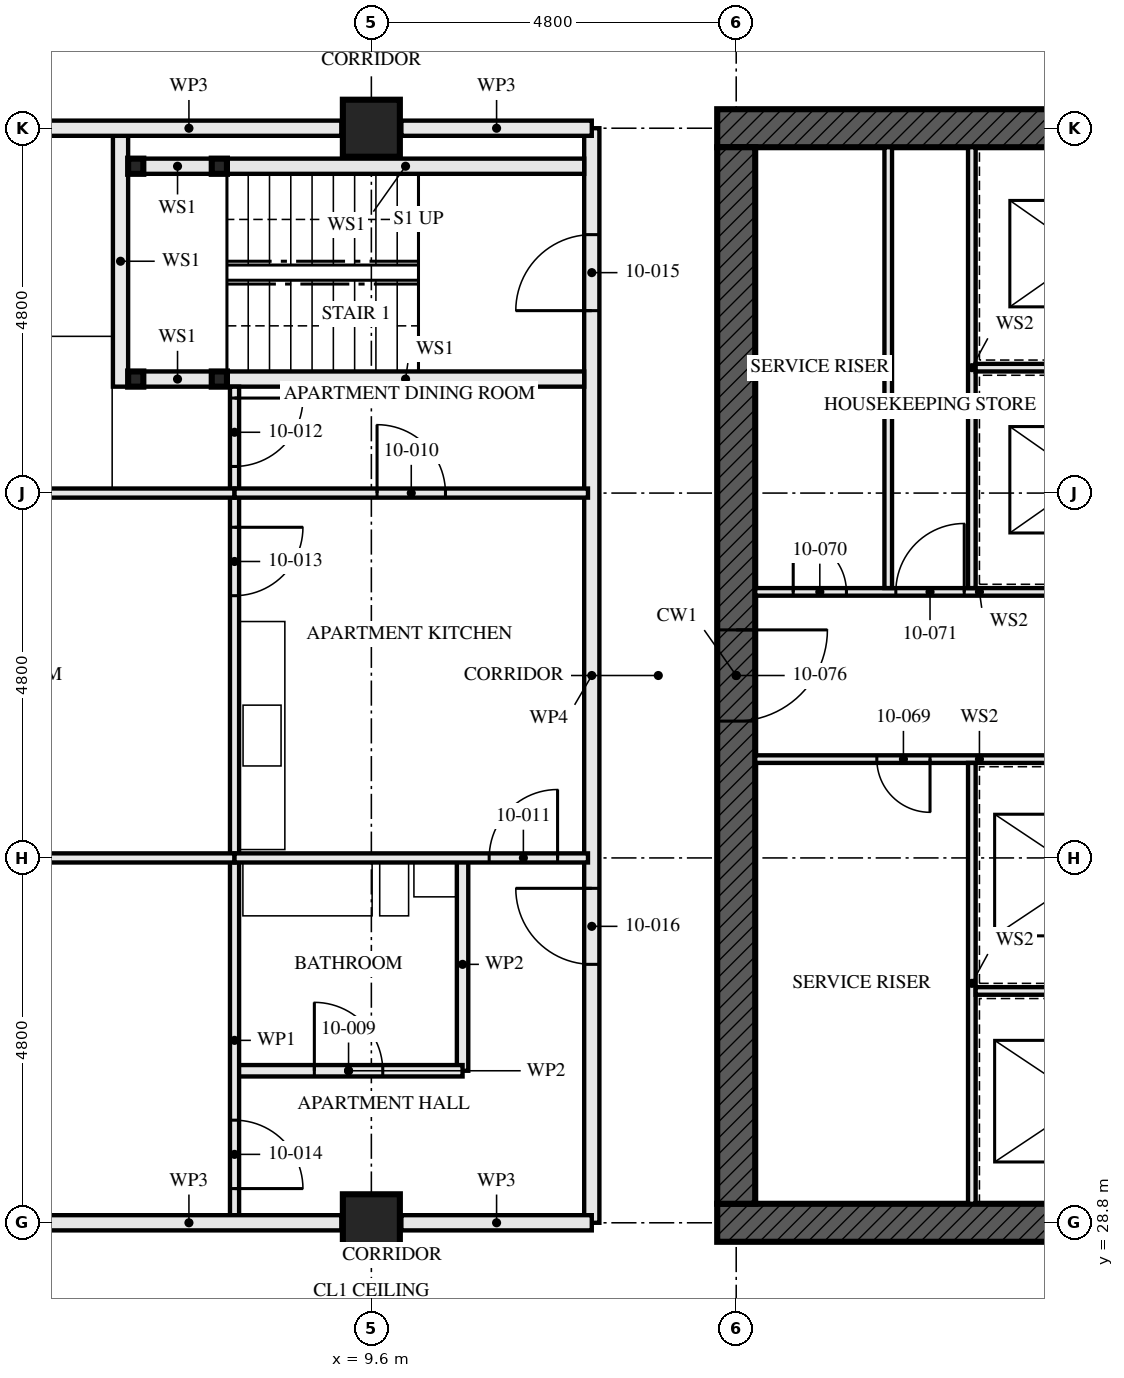
"""IFC4 building model, lengths in metres.
Left out: names, types, materials, properties, quantities, classifications, styles, units other than length and angle.
Written with IfcOpenShell. Run it as: python <this file> out.ifc"""

import sys

from ifc_helpers import new_model, si_unit, direction, frame, frame_2d, origin, origin_2d, place, context, subcontext, project, spatial, rectangle, hollow_rectangle, extrude, element, fill, save


model = new_model("IFC4")
c1 = context("Model", 3, precision=1e-05, world=origin(), true_north=direction((0.0, 1.0)))
c2 = subcontext(c1, "Body", "Model", "MODEL_VIEW")
j1 = project(units=[si_unit("LENGTHUNIT", "METRE"), si_unit("PLANEANGLEUNIT", "RADIAN")], contexts=[c1])
p1 = place(None, origin())
s1 = spatial("IfcSite", under=j1, at=p1, CompositionType="ELEMENT")
p2 = place(p1, origin())
s2 = spatial("IfcBuilding", under=s1, at=p2, CompositionType="ELEMENT")
p3 = place(p2, frame((0.0, 0.0, 41.0)))
s3 = spatial("IfcBuildingStorey", under=s2, at=p3, CompositionType="ELEMENT", Elevation=41.0)
for number, where, z_axis, x_axis in (
    (1, (9.6, 28.8, 0.0), (0.0, 0.0, 1.0), (0.0, 1.0, 0.0)),
    (2, (9.6, 43.2, 0.0), (0.0, 0.0, 1.0), (0.0, 1.0, 0.0)),
):
    element("IfcColumn", number, at=place(p3, frame(where, z_axis=z_axis, x_axis=x_axis)), inside=s3, PredefinedType="COLUMN", context=c2, shape_type="SweptSolid", body=[
        extrude(hollow_rectangle(XDim=0.75, YDim=0.75, WallThickness=0.08, at=origin_2d()), origin(), (0.0, 0.0, 1.0), 3.5),
    ])
p4 = place(p3, frame((14.15, 28.8, -0.17), z_axis=(0.0, 0.0, 1.0), x_axis=(1.0, 0.0, 0.0)))
e3 = element("IfcWall", 3, at=p4, inside=s3, PredefinedType="SHEAR", context=c2, shape_type="SweptSolid", body=[
    extrude(rectangle(XDim=14.9, YDim=0.5, at=frame_2d((7.45, 0.0))), origin(), (0.0, 0.0, 1.0), 3.5),
])
p5 = place(p4, frame((6.85, 0.0, 0.17)))
e4 = element("IfcOpeningElement", 4, at=p5, cuts=e3, PredefinedType="OPENING", context=c2, shape_type="SweptSolid", body=[
    extrude(rectangle(XDim=1.2, YDim=2.1, at=frame_2d((0.6, 1.05))), frame((0.0, 0.26, 0.0), z_axis=(0.0, -1.0, 0.0), x_axis=(1.0, 0.0, 0.0)), (0.0, 0.0, 1.0), 0.521),
])
p6 = place(p3, frame((29.05, 43.2, -0.17), z_axis=(0.0, 0.0, 1.0), x_axis=(-1.0, 0.0, 0.0)))
e5 = element("IfcWall", 5, at=p6, inside=s3, PredefinedType="SHEAR", context=c2, shape_type="SweptSolid", body=[
    extrude(rectangle(XDim=14.9, YDim=0.5, at=frame_2d((7.45, 0.0))), origin(), (0.0, 0.0, 1.0), 3.5),
])
p7 = place(p6, frame((6.85, 0.0, 0.17)))
e6 = element("IfcOpeningElement", 6, at=p7, cuts=e5, PredefinedType="OPENING", context=c2, shape_type="SweptSolid", body=[
    extrude(rectangle(XDim=1.2, YDim=2.1, at=frame_2d((0.6, 1.05))), frame((0.0, 0.26, 0.0), z_axis=(0.0, -1.0, 0.0), x_axis=(1.0, 0.0, 0.0)), (0.0, 0.0, 1.0), 0.521),
])
p8 = place(p3, frame((14.4, 42.95, -0.17), z_axis=(0.0, 0.0, 1.0), x_axis=(0.0, -1.0, 0.0)))
e7 = element("IfcWall", 7, at=p8, inside=s3, PredefinedType="SHEAR", context=c2, shape_type="SweptSolid", body=[
    extrude(rectangle(XDim=13.9, YDim=0.5, at=frame_2d((6.95, 0.0))), origin(), (0.0, 0.0, 1.0), 3.5),
])
p9 = place(p8, frame((6.35, 0.0, 0.17)))
e8 = element("IfcOpeningElement", 8, at=p9, cuts=e7, PredefinedType="OPENING", context=c2, shape_type="SweptSolid", body=[
    extrude(rectangle(XDim=1.2, YDim=2.1, at=frame_2d((0.6, 1.05))), frame((0.0, 0.26, 0.0), z_axis=(0.0, -1.0, 0.0), x_axis=(1.0, 0.0, 0.0)), (0.0, 0.0, 1.0), 0.521),
])
for number, where, z_axis, x_axis in (
    (9, (6.5, 42.7, 0.0), (0.0, 0.0, 1.0), (1.0, 0.0, 0.0)),
    (10, (6.5, 39.9, 0.0), (0.0, 0.0, 1.0), (1.0, 0.0, 0.0)),
    (11, (7.6, 42.7, 0.0), (0.0, 0.0, 1.0), (1.0, 0.0, 0.0)),
    (12, (7.6, 39.9, 0.0), (0.0, 0.0, 1.0), (1.0, 0.0, 0.0)),
):
    element("IfcColumn", number, at=place(p3, frame(where, z_axis=z_axis, x_axis=x_axis)), inside=s3, PredefinedType="COLUMN", context=c2, shape_type="SweptSolid", body=[
        extrude(hollow_rectangle(XDim=0.2, YDim=0.2, WallThickness=0.008, at=origin_2d()), origin(), (0.0, 0.0, 1.0), 3.33),
    ])
p10 = place(p3, frame((6.6, 42.7, 0.0), z_axis=(0.0, 0.0, 1.0), x_axis=(1.0, 0.0, 0.0)))
e13 = element("IfcWall", 13, at=p10, inside=s3, PredefinedType="SOLIDWALL", context=c2, shape_type="SweptSolid", body=[
    extrude(rectangle(XDim=0.9, YDim=0.2, at=frame_2d((0.45, 0.0))), origin(), (0.0, 0.0, 1.0), 2.99),
])
p11 = place(p3, frame((7.7, 42.7, 0.0), z_axis=(0.0, 0.0, 1.0), x_axis=(1.0, 0.0, 0.0)))
e14 = element("IfcWall", 14, at=p11, inside=s3, PredefinedType="SOLIDWALL", context=c2, shape_type="SweptSolid", body=[
    extrude(rectangle(XDim=4.7, YDim=0.2, at=frame_2d((2.35, 0.0))), origin(), (0.0, 0.0, 1.0), 2.99),
])
p12 = place(p3, frame((6.6, 39.9, 0.0), z_axis=(0.0, 0.0, 1.0), x_axis=(1.0, 0.0, 0.0)))
e15 = element("IfcWall", 15, at=p12, inside=s3, PredefinedType="SOLIDWALL", context=c2, shape_type="SweptSolid", body=[
    extrude(rectangle(XDim=0.9, YDim=0.2, at=frame_2d((0.45, 0.0))), origin(), (0.0, 0.0, 1.0), 2.99),
])
p13 = place(p3, frame((7.7, 39.9, 0.0), z_axis=(0.0, 0.0, 1.0), x_axis=(1.0, 0.0, 0.0)))
e16 = element("IfcWall", 16, at=p13, inside=s3, PredefinedType="SOLIDWALL", context=c2, shape_type="SweptSolid", body=[
    extrude(rectangle(XDim=4.7, YDim=0.2, at=frame_2d((2.35, 0.0))), origin(), (0.0, 0.0, 1.0), 2.99),
])
p14 = place(p3, frame((6.3, 43.1, 0.0), z_axis=(0.0, 0.0, 1.0), x_axis=(0.0, -1.0, 0.0)))
e17 = element("IfcWall", 17, at=p14, inside=s3, PredefinedType="SOLIDWALL", context=c2, shape_type="SweptSolid", body=[
    extrude(rectangle(XDim=3.3, YDim=0.2, at=frame_2d((1.65, 0.0))), origin(), (0.0, 0.0, 1.0), 3.33),
])
p15 = place(p3, frame((7.8, 30.8, 0.0), z_axis=(0.0, 0.0, 1.0), x_axis=(1.0, 0.0, 0.0)))
e18 = element("IfcWall", 18, at=p15, inside=s3, PredefinedType="PARTITIONING", context=c2, shape_type="SweptSolid", body=[
    extrude(rectangle(XDim=3.0, YDim=0.15, at=frame_2d((1.5, 0.0))), origin(), (0.0, 0.0, 1.0), 3.33),
])
p16 = place(p15, frame((1.05, 0.0, 0.0)))
e19 = element("IfcOpeningElement", 19, at=p16, cuts=e18, PredefinedType="OPENING", context=c2, shape_type="SweptSolid", body=[
    extrude(rectangle(XDim=0.9, YDim=2.1, at=frame_2d((0.45, 1.05))), frame((0.0, 0.085, 0.0), z_axis=(0.0, -1.0, 0.0), x_axis=(1.0, 0.0, 0.0)), (0.0, 0.0, 1.0), 0.171),
])
p17 = place(p3, frame((10.8, 33.6, 0.0), z_axis=(0.0, 0.0, 1.0), x_axis=(0.0, -1.0, 0.0)))
e20 = element("IfcWall", 20, at=p17, inside=s3, PredefinedType="PARTITIONING", context=c2, shape_type="SweptSolid", body=[
    extrude(rectangle(XDim=2.8, YDim=0.15, at=frame_2d((1.4, 0.0))), origin(), (0.0, 0.0, 1.0), 3.33),
])
p18 = place(p3, frame((7.8, 38.4, 0.0), z_axis=(0.0, 0.0, 1.0), x_axis=(1.0, 0.0, 0.0)))
e21 = element("IfcWall", 21, at=p18, inside=s3, PredefinedType="PARTITIONING", context=c2, shape_type="SweptSolid", body=[
    extrude(rectangle(XDim=4.65, YDim=0.12, at=frame_2d((2.325, 0.0))), origin(), (0.0, 0.0, 1.0), 2.55),
])
p19 = place(p18, frame((1.875, 0.0, 0.0)))
e22 = element("IfcOpeningElement", 22, at=p19, cuts=e21, PredefinedType="OPENING", context=c2, shape_type="SweptSolid", body=[
    extrude(rectangle(XDim=0.9, YDim=2.1, at=frame_2d((0.45, 1.05))), frame((0.0, 0.071, 0.0), z_axis=(0.0, -1.0, 0.0), x_axis=(1.0, 0.0, 0.0)), (0.0, 0.0, 1.0), 0.141),
])
p20 = place(p3, frame((7.8, 33.6, 0.0), z_axis=(0.0, 0.0, 1.0), x_axis=(1.0, 0.0, 0.0)))
e23 = element("IfcWall", 23, at=p20, inside=s3, PredefinedType="PARTITIONING", context=c2, shape_type="SweptSolid", body=[
    extrude(rectangle(XDim=4.65, YDim=0.12, at=frame_2d((2.325, 0.0))), origin(), (0.0, 0.0, 1.0), 2.55),
])
p21 = place(p20, frame((3.35, 0.0, 0.0)))
e24 = element("IfcOpeningElement", 24, at=p21, cuts=e23, PredefinedType="OPENING", context=c2, shape_type="SweptSolid", body=[
    extrude(rectangle(XDim=0.9, YDim=2.1, at=frame_2d((0.45, 1.05))), frame((0.0, 0.071, 0.0), z_axis=(0.0, -1.0, 0.0), x_axis=(1.0, 0.0, 0.0)), (0.0, 0.0, 1.0), 0.141),
])
p22 = place(p3, frame((7.8, 39.8, 0.0), z_axis=(0.0, 0.0, 1.0), x_axis=(0.0, -1.0, 0.0)))
e25 = element("IfcWall", 25, at=p22, inside=s3, PredefinedType="PARTITIONING", context=c2, shape_type="SweptSolid", body=[
    extrude(rectangle(XDim=1.4, YDim=0.12, at=frame_2d((0.7, 0.0))), origin(), (0.0, 0.0, 1.0), 3.33),
])
p23 = place(p22, frame((0.15, 0.0, 0.0)))
e26 = element("IfcOpeningElement", 26, at=p23, cuts=e25, PredefinedType="OPENING", context=c2, shape_type="SweptSolid", body=[
    extrude(rectangle(XDim=0.9, YDim=2.1, at=frame_2d((0.45, 1.05))), frame((0.0, 0.071, 0.0), z_axis=(0.0, -1.0, 0.0), x_axis=(1.0, 0.0, 0.0)), (0.0, 0.0, 1.0), 0.141),
])
p24 = place(p3, frame((7.8, 38.4, 0.0), z_axis=(0.0, 0.0, 1.0), x_axis=(0.0, -1.0, 0.0)))
e27 = element("IfcWall", 27, at=p24, inside=s3, PredefinedType="PARTITIONING", context=c2, shape_type="SweptSolid", body=[
    extrude(rectangle(XDim=4.8, YDim=0.12, at=frame_2d((2.4, 0.0))), origin(), (0.0, 0.0, 1.0), 3.33),
])
p25 = place(p24, frame((0.45, 0.0, 0.0)))
e28 = element("IfcOpeningElement", 28, at=p25, cuts=e27, PredefinedType="OPENING", context=c2, shape_type="SweptSolid", body=[
    extrude(rectangle(XDim=0.9, YDim=2.1, at=frame_2d((0.45, 1.05))), frame((0.0, 0.071, 0.0), z_axis=(0.0, -1.0, 0.0), x_axis=(1.0, 0.0, 0.0)), (0.0, 0.0, 1.0), 0.141),
])
p26 = place(p3, frame((7.8, 33.6, 0.0), z_axis=(0.0, 0.0, 1.0), x_axis=(0.0, -1.0, 0.0)))
e29 = element("IfcWall", 29, at=p26, inside=s3, PredefinedType="PARTITIONING", context=c2, shape_type="SweptSolid", body=[
    extrude(rectangle(XDim=4.8, YDim=0.12, at=frame_2d((2.4, 0.0))), origin(), (0.0, 0.0, 1.0), 3.33),
])
p27 = place(p26, frame((3.45, 0.0, 0.0)))
e30 = element("IfcOpeningElement", 30, at=p27, cuts=e29, PredefinedType="OPENING", context=c2, shape_type="SweptSolid", body=[
    extrude(rectangle(XDim=0.9, YDim=2.1, at=frame_2d((0.45, 1.05))), frame((0.0, 0.071, 0.0), z_axis=(0.0, -1.0, 0.0), x_axis=(1.0, 0.0, 0.0)), (0.0, 0.0, 1.0), 0.141),
])
for number, where, z_axis, x_axis in (
    (31, (0.395, 38.4, 0.0), (0.0, 0.0, 1.0), (1.0, 0.0, 0.0)),
    (32, (0.395, 33.6, 0.0), (0.0, 0.0, 1.0), (1.0, 0.0, 0.0)),
):
    element("IfcWall", number, at=place(p3, frame(where, z_axis=z_axis, x_axis=x_axis)), inside=s3, PredefinedType="PARTITIONING", context=c2, shape_type="SweptSolid", body=[
        extrude(rectangle(XDim=7.405, YDim=0.12, at=frame_2d((3.703, 0.0))), origin(), (0.0, 0.0, 1.0), 2.55),
    ])
p28 = place(p3, frame((12.5, 43.2, 0.0), z_axis=(0.0, 0.0, 1.0), x_axis=(0.0, -1.0, 0.0)))
e33 = element("IfcWall", 33, at=p28, inside=s3, PredefinedType="PARTITIONING", context=c2, shape_type="SweptSolid", body=[
    extrude(rectangle(XDim=14.4, YDim=0.2, at=frame_2d((7.2, 0.0))), origin(), (0.0, 0.0, 1.0), 2.55),
])
p29 = place(p28, frame((1.4, 0.0, 0.0)))
e34 = element("IfcOpeningElement", 34, at=p29, cuts=e33, PredefinedType="OPENING", context=c2, shape_type="SweptSolid", body=[
    extrude(rectangle(XDim=1.0, YDim=2.1, at=frame_2d((0.5, 1.05))), frame((0.0, 0.111, 0.0), z_axis=(0.0, -1.0, 0.0), x_axis=(1.0, 0.0, 0.0)), (0.0, 0.0, 1.0), 0.221),
])
p30 = place(p28, frame((10.0, 0.0, 0.0)))
e35 = element("IfcOpeningElement", 35, at=p30, cuts=e33, PredefinedType="OPENING", context=c2, shape_type="SweptSolid", body=[
    extrude(rectangle(XDim=1.0, YDim=2.1, at=frame_2d((0.5, 1.05))), frame((0.0, 0.111, 0.0), z_axis=(0.0, -1.0, 0.0), x_axis=(1.0, 0.0, 0.0)), (0.0, 0.0, 1.0), 0.221),
])
p31 = place(p3, frame((16.4, 37.15, 0.0), z_axis=(0.0, 0.0, 1.0), x_axis=(0.0, 1.0, 0.0)))
e36 = element("IfcWall", 36, at=p31, inside=s3, PredefinedType="SOLIDWALL", context=c2, shape_type="SweptSolid", body=[
    extrude(rectangle(XDim=5.8, YDim=0.1, at=frame_2d((2.9, 0.0))), origin(), (0.0, 0.0, 1.0), 3.33),
])
p32 = place(p3, frame((14.65, 34.9, 0.0), z_axis=(0.0, 0.0, 1.0), x_axis=(1.0, 0.0, 0.0)))
e37 = element("IfcWall", 37, at=p32, inside=s3, PredefinedType="SOLIDWALL", context=c2, shape_type="SweptSolid", body=[
    extrude(rectangle(XDim=5.9, YDim=0.1, at=frame_2d((2.95, 0.0))), origin(), (0.0, 0.0, 1.0), 3.33),
])
p33 = place(p32, frame((1.6, 0.0, 0.0)))
e38 = element("IfcOpeningElement", 38, at=p33, cuts=e37, PredefinedType="OPENING", context=c2, shape_type="SweptSolid", body=[
    extrude(rectangle(XDim=0.7, YDim=2.1, at=frame_2d((0.35, 1.05))), frame((0.0, 0.061, 0.0), z_axis=(0.0, -1.0, 0.0), x_axis=(1.0, 0.0, 0.0)), (0.0, 0.0, 1.0), 0.121),
])
p34 = place(p3, frame((14.65, 37.1, 0.0), z_axis=(0.0, 0.0, 1.0), x_axis=(1.0, 0.0, 0.0)))
e39 = element("IfcWall", 39, at=p34, inside=s3, PredefinedType="SOLIDWALL", context=c2, shape_type="SweptSolid", body=[
    extrude(rectangle(XDim=5.9, YDim=0.1, at=frame_2d((2.95, 0.0))), origin(), (0.0, 0.0, 1.0), 3.33),
])
p35 = place(p34, frame((0.5, 0.0, 0.0)))
e40 = element("IfcOpeningElement", 40, at=p35, cuts=e39, PredefinedType="OPENING", context=c2, shape_type="SweptSolid", body=[
    extrude(rectangle(XDim=0.7, YDim=2.1, at=frame_2d((0.35, 1.05))), frame((0.0, 0.061, 0.0), z_axis=(0.0, -1.0, 0.0), x_axis=(1.0, 0.0, 0.0)), (0.0, 0.0, 1.0), 0.121),
])
p36 = place(p34, frame((1.85, 0.0, 0.0)))
e41 = element("IfcOpeningElement", 41, at=p36, cuts=e39, PredefinedType="OPENING", context=c2, shape_type="SweptSolid", body=[
    extrude(rectangle(XDim=0.9, YDim=2.1, at=frame_2d((0.45, 1.05))), frame((0.0, 0.061, 0.0), z_axis=(0.0, -1.0, 0.0), x_axis=(1.0, 0.0, 0.0)), (0.0, 0.0, 1.0), 0.121),
])
p37 = place(p3, frame((17.5, 29.05, 0.0), z_axis=(0.0, 0.0, 1.0), x_axis=(0.0, 1.0, 0.0)))
e42 = element("IfcWall", 42, at=p37, inside=s3, PredefinedType="SOLIDWALL", context=c2, shape_type="SweptSolid", body=[
    extrude(rectangle(XDim=5.8, YDim=0.1, at=frame_2d((2.9, 0.0))), origin(), (0.0, 0.0, 1.0), 3.33),
])
p38 = place(p3, frame((17.55, 31.85, 0.0), z_axis=(0.0, 0.0, 1.0), x_axis=(1.0, 0.0, 0.0)))
e43 = element("IfcWall", 43, at=p38, inside=s3, PredefinedType="SOLIDWALL", context=c2, shape_type="SweptSolid", body=[
    extrude(rectangle(XDim=2.9, YDim=0.1, at=frame_2d((1.45, 0.0))), origin(), (0.0, 0.0, 1.0), 3.33),
])
p39 = place(p3, frame((17.5, 37.15, 0.0), z_axis=(0.0, 0.0, 1.0), x_axis=(0.0, 1.0, 0.0)))
e44 = element("IfcWall", 44, at=p39, inside=s3, PredefinedType="SOLIDWALL", context=c2, shape_type="SweptSolid", body=[
    extrude(rectangle(XDim=5.8, YDim=0.1, at=frame_2d((2.9, 0.0))), origin(), (0.0, 0.0, 1.0), 3.33),
])
p40 = place(p3, frame((17.55, 40.05, 0.0), z_axis=(0.0, 0.0, 1.0), x_axis=(1.0, 0.0, 0.0)))
e45 = element("IfcWall", 45, at=p40, inside=s3, PredefinedType="SOLIDWALL", context=c2, shape_type="SweptSolid", body=[
    extrude(rectangle(XDim=2.9, YDim=0.1, at=frame_2d((1.45, 0.0))), origin(), (0.0, 0.0, 1.0), 3.33),
])
p41 = place(p3, frame((12.5, 28.8, 0.0), z_axis=(0.0, 0.0, 1.0), x_axis=(-1.0, 0.0, 0.0)))
e46 = element("IfcWall", 46, at=p41, inside=s3, PredefinedType="PARTITIONING", context=c2, shape_type="SweptSolid", body=[
    extrude(rectangle(XDim=2.505, YDim=0.2, at=frame_2d((1.252, 0.0))), origin(), (0.0, 0.0, 1.0), 2.32),
])
p42 = place(p3, frame((9.205, 28.8, 0.0), z_axis=(0.0, 0.0, 1.0), x_axis=(-1.0, 0.0, 0.0)))
e47 = element("IfcWall", 47, at=p42, inside=s3, PredefinedType="PARTITIONING", context=c2, shape_type="SweptSolid", body=[
    extrude(rectangle(XDim=4.01, YDim=0.2, at=frame_2d((2.005, 0.0))), origin(), (0.0, 0.0, 1.0), 2.32),
])
p43 = place(p3, frame((12.5, 43.2, 0.0), z_axis=(0.0, 0.0, 1.0), x_axis=(-1.0, 0.0, 0.0)))
e48 = element("IfcWall", 48, at=p43, inside=s3, PredefinedType="PARTITIONING", context=c2, shape_type="SweptSolid", body=[
    extrude(rectangle(XDim=2.505, YDim=0.2, at=frame_2d((1.252, 0.0))), origin(), (0.0, 0.0, 1.0), 2.32),
])
p44 = place(p3, frame((9.205, 43.2, 0.0), z_axis=(0.0, 0.0, 1.0), x_axis=(-1.0, 0.0, 0.0)))
e49 = element("IfcWall", 49, at=p44, inside=s3, PredefinedType="PARTITIONING", context=c2, shape_type="SweptSolid", body=[
    extrude(rectangle(XDim=4.01, YDim=0.2, at=frame_2d((2.005, 0.0))), origin(), (0.0, 0.0, 1.0), 2.32),
])
p45 = place(p16, origin())
e50 = element("IfcDoor", 50, at=p45, inside=s3, OperationType="SINGLE_SWING_RIGHT", PredefinedType="DOOR", context=c2, shape_type="SweptSolid", body=[
    extrude(rectangle(XDim=0.9, YDim=2.1, at=frame_2d((0.45, 1.05))), frame((0.0, 0.022, 0.0), z_axis=(0.0, -1.0, 0.0), x_axis=(1.0, 0.0, 0.0)), (0.0, 0.0, 1.0), 0.044),
])
fill(e19, e50)
p46 = place(p19, origin())
e51 = element("IfcDoor", 51, at=p46, inside=s3, OperationType="SINGLE_SWING_RIGHT", PredefinedType="DOOR", context=c2, shape_type="SweptSolid", body=[
    extrude(rectangle(XDim=0.9, YDim=2.1, at=frame_2d((0.45, 1.05))), frame((0.0, 0.022, 0.0), z_axis=(0.0, -1.0, 0.0), x_axis=(1.0, 0.0, 0.0)), (0.0, 0.0, 1.0), 0.044),
])
fill(e22, e51)
p47 = place(p21, origin())
e52 = element("IfcDoor", 52, at=p47, inside=s3, OperationType="SINGLE_SWING_LEFT", PredefinedType="DOOR", context=c2, shape_type="SweptSolid", body=[
    extrude(rectangle(XDim=0.9, YDim=2.1, at=frame_2d((0.45, 1.05))), frame((0.0, 0.022, 0.0), z_axis=(0.0, -1.0, 0.0), x_axis=(1.0, 0.0, 0.0)), (0.0, 0.0, 1.0), 0.044),
])
fill(e24, e52)
p48 = place(p23, origin())
e53 = element("IfcDoor", 53, at=p48, inside=s3, OperationType="SINGLE_SWING_RIGHT", PredefinedType="DOOR", context=c2, shape_type="SweptSolid", body=[
    extrude(rectangle(XDim=0.9, YDim=2.1, at=frame_2d((0.45, 1.05))), frame((0.0, 0.022, 0.0), z_axis=(0.0, -1.0, 0.0), x_axis=(1.0, 0.0, 0.0)), (0.0, 0.0, 1.0), 0.044),
])
fill(e26, e53)
p49 = place(p25, origin())
e54 = element("IfcDoor", 54, at=p49, inside=s3, OperationType="SINGLE_SWING_RIGHT", PredefinedType="DOOR", context=c2, shape_type="SweptSolid", body=[
    extrude(rectangle(XDim=0.9, YDim=2.1, at=frame_2d((0.45, 1.05))), frame((0.0, 0.022, 0.0), z_axis=(0.0, -1.0, 0.0), x_axis=(1.0, 0.0, 0.0)), (0.0, 0.0, 1.0), 0.044),
])
fill(e28, e54)
p50 = place(p27, origin())
e55 = element("IfcDoor", 55, at=p50, inside=s3, OperationType="SINGLE_SWING_LEFT", PredefinedType="DOOR", context=c2, shape_type="SweptSolid", body=[
    extrude(rectangle(XDim=0.9, YDim=2.1, at=frame_2d((0.45, 1.05))), frame((0.0, 0.022, 0.0), z_axis=(0.0, -1.0, 0.0), x_axis=(1.0, 0.0, 0.0)), (0.0, 0.0, 1.0), 0.044),
])
fill(e30, e55)
p51 = place(p29, frame((1.0, 0.0, 0.0), z_axis=(0.0, 0.0, 1.0), x_axis=(-1.0, 0.0, 0.0)))
e56 = element("IfcDoor", 56, at=p51, inside=s3, OperationType="SINGLE_SWING_RIGHT", PredefinedType="DOOR", context=c2, shape_type="SweptSolid", body=[
    extrude(rectangle(XDim=1.0, YDim=2.1, at=frame_2d((0.5, 1.05))), frame((0.0, 0.032, 0.0), z_axis=(0.0, -1.0, 0.0), x_axis=(1.0, 0.0, 0.0)), (0.0, 0.0, 1.0), 0.064),
])
fill(e34, e56)
p52 = place(p30, frame((1.0, 0.0, 0.0), z_axis=(0.0, 0.0, 1.0), x_axis=(-1.0, 0.0, 0.0)))
e57 = element("IfcDoor", 57, at=p52, inside=s3, OperationType="SINGLE_SWING_LEFT", PredefinedType="DOOR", context=c2, shape_type="SweptSolid", body=[
    extrude(rectangle(XDim=1.0, YDim=2.1, at=frame_2d((0.5, 1.05))), frame((0.0, 0.027, 0.0), z_axis=(0.0, -1.0, 0.0), x_axis=(1.0, 0.0, 0.0)), (0.0, 0.0, 1.0), 0.054),
])
fill(e35, e57)
p53 = place(p33, frame((0.7, 0.0, 0.0), z_axis=(0.0, 0.0, 1.0), x_axis=(-1.0, 0.0, 0.0)))
e58 = element("IfcDoor", 58, at=p53, inside=s3, OperationType="SINGLE_SWING_RIGHT", PredefinedType="DOOR", context=c2, shape_type="SweptSolid", body=[
    extrude(rectangle(XDim=0.7, YDim=2.1, at=frame_2d((0.35, 1.05))), frame((0.0, 0.027, 0.0), z_axis=(0.0, -1.0, 0.0), x_axis=(1.0, 0.0, 0.0)), (0.0, 0.0, 1.0), 0.054),
])
fill(e38, e58)
p54 = place(p35, origin())
e59 = element("IfcDoor", 59, at=p54, inside=s3, OperationType="SINGLE_SWING_RIGHT", PredefinedType="DOOR", context=c2, shape_type="SweptSolid", body=[
    extrude(rectangle(XDim=0.7, YDim=2.1, at=frame_2d((0.35, 1.05))), frame((0.0, 0.027, 0.0), z_axis=(0.0, -1.0, 0.0), x_axis=(1.0, 0.0, 0.0)), (0.0, 0.0, 1.0), 0.054),
])
fill(e40, e59)
p55 = place(p36, origin())
e60 = element("IfcDoor", 60, at=p55, inside=s3, OperationType="SINGLE_SWING_LEFT", PredefinedType="DOOR", context=c2, shape_type="SweptSolid", body=[
    extrude(rectangle(XDim=0.9, YDim=2.1, at=frame_2d((0.45, 1.05))), frame((0.0, 0.027, 0.0), z_axis=(0.0, -1.0, 0.0), x_axis=(1.0, 0.0, 0.0)), (0.0, 0.0, 1.0), 0.054),
])
fill(e41, e60)
p56 = place(p9, origin())
e61 = element("IfcDoor", 61, at=p56, inside=s3, OperationType="SINGLE_SWING_LEFT", PredefinedType="DOOR", context=c2, shape_type="SweptSolid", body=[
    extrude(rectangle(XDim=1.2, YDim=2.1, at=frame_2d((0.6, 1.05))), frame((0.0, 0.027, 0.0), z_axis=(0.0, -1.0, 0.0), x_axis=(1.0, 0.0, 0.0)), (0.0, 0.0, 1.0), 0.054),
])
fill(e8, e61)
save(model, sys.argv[1])
